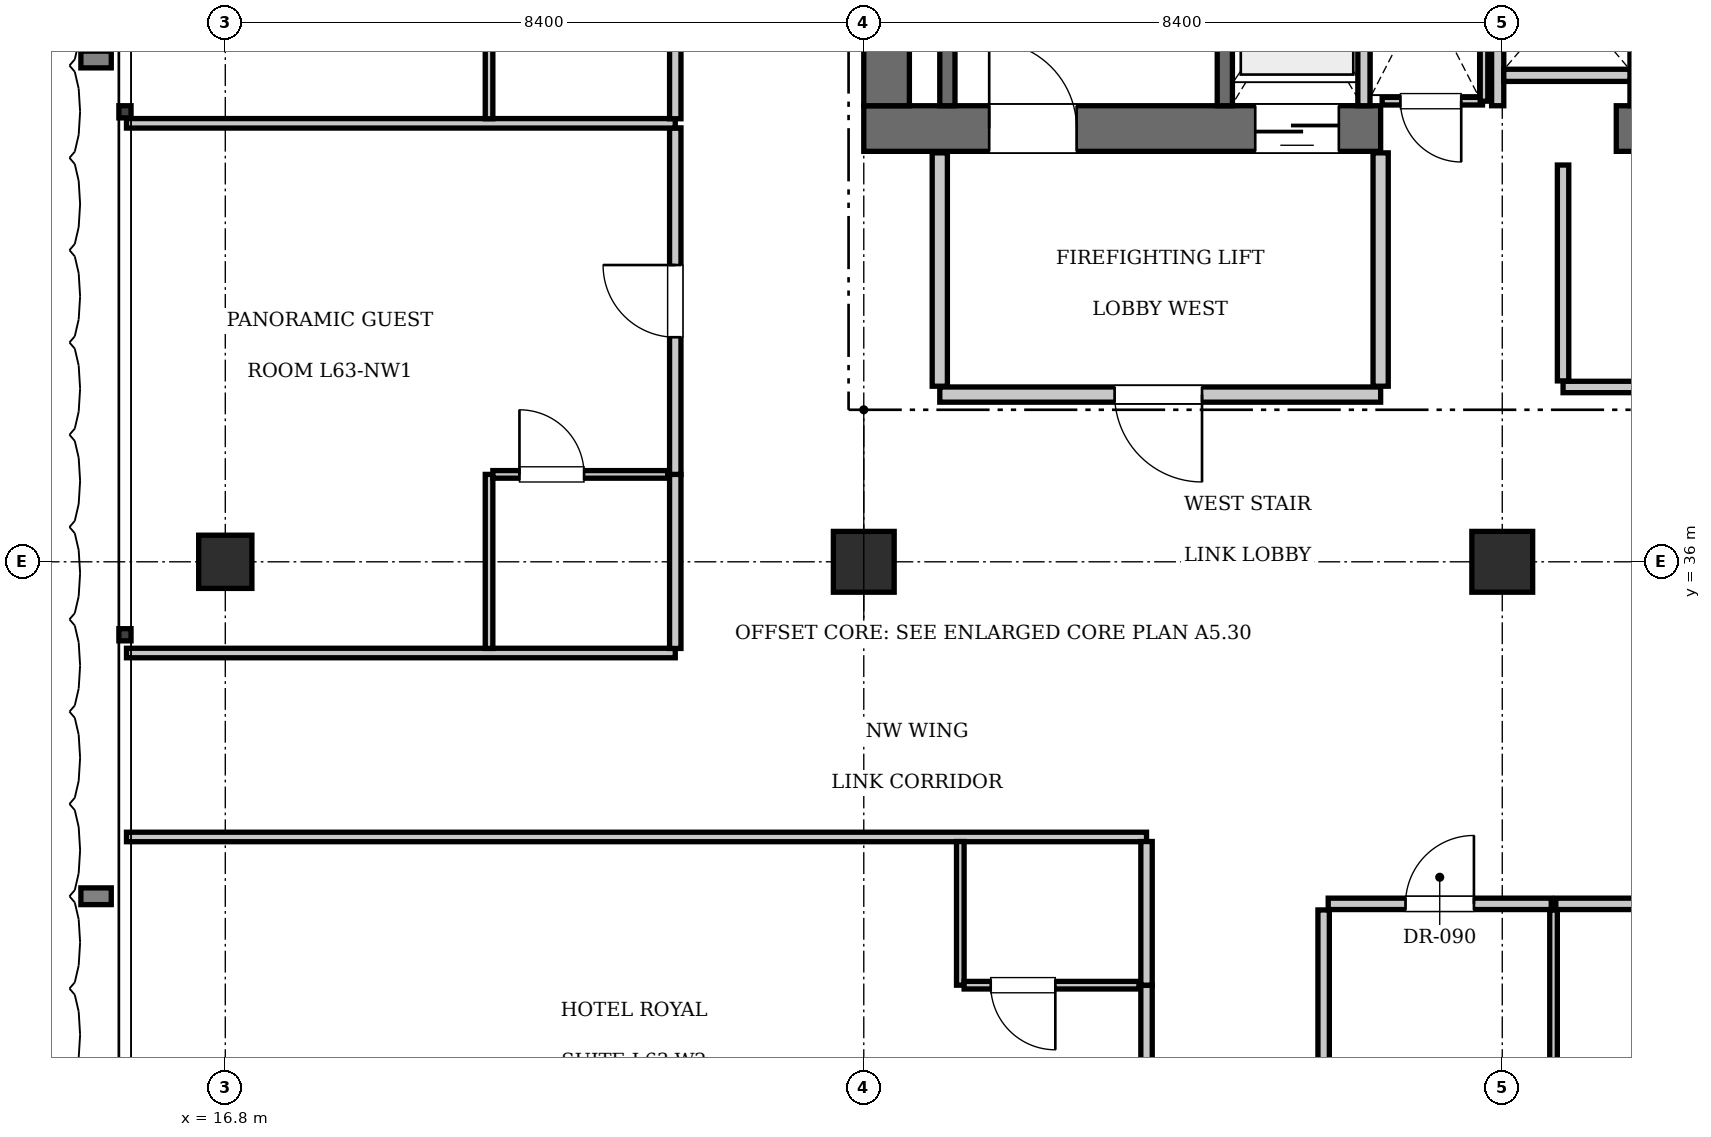
"""IFC4 building model, lengths in metres.
Left out: names, types, materials, properties, quantities, classifications, styles, units other than length and angle.
Written with IfcOpenShell. Run it as: python <this file> out.ifc"""

import sys

from ifc_helpers import new_model, si_unit, direction, frame, frame_2d, origin, origin_2d, place, context, subcontext, project, spatial, rectangle, extrude, element, fill, save


model = new_model("IFC4")
c1 = context("Model", 3, precision=1e-05, world=origin(), true_north=direction((0.0, 1.0)))
c2 = subcontext(c1, "Body", "Model", "MODEL_VIEW")
j1 = project(units=[si_unit("LENGTHUNIT", "METRE"), si_unit("PLANEANGLEUNIT", "RADIAN")], contexts=[c1])
p1 = place(None, origin())
s1 = spatial("IfcSite", under=j1, at=p1, CompositionType="ELEMENT")
p2 = place(p1, origin())
s2 = spatial("IfcBuilding", under=s1, at=p2, CompositionType="ELEMENT")
p3 = place(p2, frame((0.0, 0.0, 258.65)))
s3 = spatial("IfcBuildingStorey", under=s2, at=p3, CompositionType="ELEMENT", Elevation=258.65)
p4 = place(p3, frame((25.2, 41.7, 0.0), z_axis=(0.0, 0.0, 1.0), x_axis=(1.0, 0.0, 0.0)))
e1 = element("IfcWall", 1, at=p4, inside=s3, PredefinedType="SHEAR", context=c2, shape_type="SweptSolid", body=[
    extrude(rectangle(XDim=6.8, YDim=0.6, at=frame_2d((3.4, 0.0))), origin(), (0.0, 0.0, 1.0), 3.85),
])
p5 = place(p4, frame((1.65, 0.0, 0.0)))
e2 = element("IfcOpeningElement", 2, at=p5, cuts=e1, PredefinedType="OPENING", context=c2, shape_type="SweptSolid", body=[
    extrude(rectangle(XDim=1.15, YDim=2.15, at=frame_2d((0.575, 1.075))), frame((0.0, 0.31, 0.0), z_axis=(0.0, -1.0, 0.0), x_axis=(1.0, 0.0, 0.0)), (0.0, 0.0, 1.0), 0.62),
])
p6 = place(p4, frame((5.15, 0.0, 0.0)))
e3 = element("IfcOpeningElement", 3, at=p6, cuts=e1, PredefinedType="OPENING", context=c2, shape_type="SweptSolid", body=[
    extrude(rectangle(XDim=1.1, YDim=2.2, at=frame_2d((0.55, 1.1))), frame((0.0, 0.31, 0.0), z_axis=(0.0, -1.0, 0.0), x_axis=(1.0, 0.0, 0.0)), (0.0, 0.0, 1.0), 0.62),
])
p7 = place(p3, frame((35.1, 41.7, 0.0), z_axis=(0.0, 0.0, 1.0), x_axis=(1.0, 0.0, 0.0)))
e4 = element("IfcWall", 4, at=p7, inside=s3, PredefinedType="SHEAR", context=c2, shape_type="SweptSolid", body=[
    extrude(rectangle(XDim=5.4, YDim=0.6, at=frame_2d((2.7, 0.0))), origin(), (0.0, 0.0, 1.0), 3.85),
])
p8 = place(p3, frame((25.5, 42.0, 0.0), z_axis=(0.0, 0.0, 1.0), x_axis=(0.0, 1.0, 0.0)))
e5 = element("IfcWall", 5, at=p8, inside=s3, PredefinedType="SHEAR", context=c2, shape_type="SweptSolid", body=[
    extrude(rectangle(XDim=2.2, YDim=0.6, at=frame_2d((1.1, 0.0))), origin(), (0.0, 0.0, 1.0), 3.85),
])
for number, where, z_axis, x_axis in (
    (6, (25.2, 36.0, 0.0), (0.0, 0.0, 1.0), (1.0, 0.0, 0.0)),
    (7, (33.6, 36.0, 0.0), (0.0, 0.0, 1.0), (1.0, 0.0, 0.0)),
):
    element("IfcColumn", number, at=place(p3, frame(where, z_axis=z_axis, x_axis=x_axis)), inside=s3, PredefinedType="COLUMN", context=c2, shape_type="SweptSolid", body=[
        extrude(rectangle(XDim=0.8, YDim=0.8, at=origin_2d()), origin(), (0.0, 0.0, 1.0), 3.85),
    ])
p9 = place(p3, frame((16.8, 36.0, 0.0), z_axis=(0.0, 0.0, 1.0), x_axis=(1.0, 0.0, 0.0)))
e8 = element("IfcColumn", 8, at=p9, inside=s3, PredefinedType="COLUMN", context=c2, shape_type="SweptSolid", body=[
    extrude(rectangle(XDim=0.7, YDim=0.7, at=origin_2d()), origin(), (0.0, 0.0, 1.0), 3.85),
])
p10 = place(p3, frame((29.95, 42.0, 0.0), z_axis=(0.0, 0.0, 1.0), x_axis=(0.0, 1.0, 0.0)))
e9 = element("IfcWall", 9, at=p10, inside=s3, PredefinedType="SOLIDWALL", context=c2, shape_type="SweptSolid", body=[
    extrude(rectangle(XDim=9.15, YDim=0.2, at=frame_2d((4.575, 0.0))), origin(), (0.0, 0.0, 1.0), 3.61),
])
p11 = place(p3, frame((26.3, 42.0, 0.0), z_axis=(0.0, 0.0, 1.0), x_axis=(0.0, 1.0, 0.0)))
e10 = element("IfcWall", 10, at=p11, inside=s3, PredefinedType="SOLIDWALL", context=c2, shape_type="SweptSolid", body=[
    extrude(rectangle(XDim=9.12, YDim=0.2, at=frame_2d((4.56, 0.0))), origin(), (0.0, 0.0, 1.0), 3.61),
])
p12 = place(p3, frame((31.78, 42.0, 0.0), z_axis=(0.0, 0.0, 1.0), x_axis=(0.0, 1.0, 0.0)))
e11 = element("IfcWall", 11, at=p12, inside=s3, PredefinedType="SOLIDWALL", context=c2, shape_type="SweptSolid", body=[
    extrude(rectangle(XDim=2.74, YDim=0.16, at=frame_2d((1.37, 0.0))), origin(), (0.0, 0.0, 1.0), 3.61),
])
for number, where, z_axis, x_axis in (
    (12, (33.54, 42.0, 0.0), (0.0, 0.0, 1.0), (0.0, 1.0, 0.0)),
    (13, (35.36, 42.0, 0.0), (0.0, 0.0, 1.0), (0.0, 1.0, 0.0)),
):
    element("IfcWall", number, at=place(p3, frame(where, z_axis=z_axis, x_axis=x_axis)), inside=s3, PredefinedType="SOLIDWALL", context=c2, shape_type="SweptSolid", body=[
        extrude(rectangle(XDim=2.4, YDim=0.16, at=frame_2d((1.2, 0.0))), origin(), (0.0, 0.0, 1.0), 3.61),
    ])
p13 = place(p3, frame((33.62, 42.4, 0.0), z_axis=(0.0, 0.0, 1.0), x_axis=(1.0, 0.0, 0.0)))
e14 = element("IfcWall", 14, at=p13, inside=s3, PredefinedType="SOLIDWALL", context=c2, shape_type="SweptSolid", body=[
    extrude(rectangle(XDim=1.66, YDim=0.16, at=frame_2d((0.83, 0.0))), origin(), (0.0, 0.0, 1.0), 3.61),
])
p14 = place(p3, frame((26.2, 38.2, 0.0), z_axis=(0.0, 0.0, 1.0), x_axis=(1.0, 0.0, 0.0)))
e15 = element("IfcWall", 15, at=p14, inside=s3, PredefinedType="PARTITIONING", context=c2, shape_type="SweptSolid", body=[
    extrude(rectangle(XDim=5.8, YDim=0.2, at=frame_2d((2.9, 0.0))), origin(), (0.0, 0.0, 1.0), 3.61),
])
p15 = place(p14, frame((2.3, 0.0, 0.0)))
e16 = element("IfcOpeningElement", 16, at=p15, cuts=e15, PredefinedType="OPENING", context=c2, shape_type="SweptSolid", body=[
    extrude(rectangle(XDim=1.15, YDim=2.15, at=frame_2d((0.575, 1.075))), frame((0.0, 0.11, 0.0), z_axis=(0.0, -1.0, 0.0), x_axis=(1.0, 0.0, 0.0)), (0.0, 0.0, 1.0), 0.22),
])
for number, where, z_axis, x_axis in (
    (17, (26.2, 38.31, 0.0), (0.0, 0.0, 1.0), (0.0, 1.0, 0.0)),
    (18, (32.0, 38.31, 0.0), (0.0, 0.0, 1.0), (0.0, 1.0, 0.0)),
):
    element("IfcWall", number, at=place(p3, frame(where, z_axis=z_axis, x_axis=x_axis)), inside=s3, PredefinedType="PARTITIONING", context=c2, shape_type="SweptSolid", body=[
        extrude(rectangle(XDim=3.07, YDim=0.2, at=frame_2d((1.535, 0.0))), origin(), (0.0, 0.0, 1.0), 3.61),
    ])
p16 = place(p3, frame((32.02, 42.06, 0.0), z_axis=(0.0, 0.0, 1.0), x_axis=(1.0, 0.0, 0.0)))
e19 = element("IfcWall", 19, at=p16, inside=s3, PredefinedType="PARTITIONING", context=c2, shape_type="SweptSolid", body=[
    extrude(rectangle(XDim=1.32, YDim=0.1, at=frame_2d((0.66, 0.0))), origin(), (0.0, 0.0, 1.0), 3.61),
])
p17 = place(p16, frame((0.24, 0.0, 0.0)))
e20 = element("IfcOpeningElement", 20, at=p17, cuts=e19, PredefinedType="OPENING", context=c2, shape_type="SweptSolid", body=[
    extrude(rectangle(XDim=0.8, YDim=2.05, at=frame_2d((0.4, 1.025))), frame((0.0, 0.06, 0.0), z_axis=(0.0, -1.0, 0.0), x_axis=(1.0, 0.0, 0.0)), (0.0, 0.0, 1.0), 0.12),
])
p18 = place(p3, frame((33.36, 42.06, 0.0), z_axis=(0.0, 0.0, 1.0), x_axis=(0.0, 1.0, 0.0)))
e21 = element("IfcWall", 21, at=p18, inside=s3, PredefinedType="PARTITIONING", context=c2, shape_type="SweptSolid", body=[
    extrude(rectangle(XDim=2.88, YDim=0.1, at=frame_2d((1.44, 0.0))), origin(), (0.0, 0.0, 1.0), 3.61),
])
p19 = place(p3, frame((34.4, 38.3, 0.0), z_axis=(0.0, 0.0, 1.0), x_axis=(1.0, 0.0, 0.0)))
e22 = element("IfcWall", 22, at=p19, inside=s3, PredefinedType="PARTITIONING", context=c2, shape_type="SweptSolid", body=[
    extrude(rectangle(XDim=5.92, YDim=0.15, at=frame_2d((2.96, 0.0))), origin(), (0.0, 0.0, 1.0), 3.61),
])
p20 = place(p19, frame((2.4, 0.0, 0.0)))
e23 = element("IfcOpeningElement", 23, at=p20, cuts=e22, PredefinedType="OPENING", context=c2, shape_type="SweptSolid", body=[
    extrude(rectangle(XDim=0.9, YDim=2.1, at=frame_2d((0.45, 1.05))), frame((0.0, 0.085, 0.0), z_axis=(0.0, -1.0, 0.0), x_axis=(1.0, 0.0, 0.0)), (0.0, 0.0, 1.0), 0.17),
])
p21 = place(p3, frame((34.4, 38.38, 0.0), z_axis=(0.0, 0.0, 1.0), x_axis=(0.0, 1.0, 0.0)))
e24 = element("IfcWall", 24, at=p21, inside=s3, PredefinedType="PARTITIONING", context=c2, shape_type="SweptSolid", body=[
    extrude(rectangle(XDim=2.84, YDim=0.15, at=frame_2d((1.42, 0.0))), origin(), (0.0, 0.0, 1.0), 3.61),
])
p22 = place(p3, frame((31.25, 22.53, 0.0), z_axis=(0.0, 0.0, 1.0), x_axis=(0.0, 1.0, 0.0)))
e25 = element("IfcWall", 25, at=p22, inside=s3, PredefinedType="PARTITIONING", context=c2, shape_type="SweptSolid", body=[
    extrude(rectangle(XDim=8.89, YDim=0.15, at=frame_2d((4.445, 0.0))), origin(), (0.0, 0.0, 1.0), 3.61),
])
p23 = place(p3, frame((31.31, 31.5, 0.0), z_axis=(0.0, 0.0, 1.0), x_axis=(1.0, 0.0, 0.0)))
e26 = element("IfcWall", 26, at=p23, inside=s3, PredefinedType="PARTITIONING", context=c2, shape_type="SweptSolid", body=[
    extrude(rectangle(XDim=2.934, YDim=0.15, at=frame_2d((1.467, 0.0))), origin(), (0.0, 0.0, 1.0), 3.61),
])
p24 = place(p23, frame((1.017, 0.0, 0.0)))
e27 = element("IfcOpeningElement", 27, at=p24, cuts=e26, PredefinedType="OPENING", context=c2, shape_type="SweptSolid", body=[
    extrude(rectangle(XDim=0.9, YDim=2.1, at=frame_2d((0.45, 1.05))), frame((0.0, 0.085, 0.0), z_axis=(0.0, -1.0, 0.0), x_axis=(1.0, 0.0, 0.0)), (0.0, 0.0, 1.0), 0.17),
])
p25 = place(p3, frame((34.274, 22.53, 0.0), z_axis=(0.0, 0.0, 1.0), x_axis=(0.0, 1.0, 0.0)))
e28 = element("IfcWall", 28, at=p25, inside=s3, PredefinedType="PARTITIONING", context=c2, shape_type="SweptSolid", body=[
    extrude(rectangle(XDim=8.89, YDim=0.1, at=frame_2d((4.445, 0.0))), origin(), (0.0, 0.0, 1.0), 3.61),
])
p26 = place(p3, frame((34.304, 31.5, 0.0), z_axis=(0.0, 0.0, 1.0), x_axis=(1.0, 0.0, 0.0)))
e29 = element("IfcWall", 29, at=p26, inside=s3, PredefinedType="PARTITIONING", context=c2, shape_type="SweptSolid", body=[
    extrude(rectangle(XDim=4.411, YDim=0.15, at=frame_2d((2.206, 0.0))), origin(), (0.0, 0.0, 1.0), 3.61),
])
p27 = place(p26, frame((1.756, 0.0, 0.0)))
e30 = element("IfcOpeningElement", 30, at=p27, cuts=e29, PredefinedType="OPENING", context=c2, shape_type="SweptSolid", body=[
    extrude(rectangle(XDim=0.9, YDim=2.1, at=frame_2d((0.45, 1.05))), frame((0.0, 0.085, 0.0), z_axis=(0.0, -1.0, 0.0), x_axis=(1.0, 0.0, 0.0)), (0.0, 0.0, 1.0), 0.17),
])
p28 = place(p3, frame((15.5, 32.38, 0.0), z_axis=(0.0, 0.0, 1.0), x_axis=(1.0, 0.0, 0.0)))
e31 = element("IfcWall", 31, at=p28, inside=s3, PredefinedType="PARTITIONING", context=c2, shape_type="SweptSolid", body=[
    extrude(rectangle(XDim=13.42, YDim=0.125, at=frame_2d((6.71, 0.0))), origin(), (0.0, 0.0, 1.0), 3.61),
])
p29 = place(p3, frame((28.92, 27.5, 0.0), z_axis=(0.0, 0.0, 1.0), x_axis=(0.0, 1.0, 0.0)))
e32 = element("IfcWall", 32, at=p29, inside=s3, PredefinedType="PARTITIONING", context=c2, shape_type="SweptSolid", body=[
    extrude(rectangle(XDim=2.93, YDim=0.15, at=frame_2d((1.465, 0.0))), origin(), (0.0, 0.0, 1.0), 3.61),
])
p30 = place(p29, frame((0.99, 0.0, 0.0)))
e33 = element("IfcOpeningElement", 33, at=p30, cuts=e32, PredefinedType="OPENING", context=c2, shape_type="SweptSolid", body=[
    extrude(rectangle(XDim=0.95, YDim=2.15, at=frame_2d((0.475, 1.075))), frame((0.0, 0.085, 0.0), z_axis=(0.0, -1.0, 0.0), x_axis=(1.0, 0.0, 0.0)), (0.0, 0.0, 1.0), 0.17),
])
p31 = place(p3, frame((28.92, 30.43, 0.0), z_axis=(0.0, 0.0, 1.0), x_axis=(0.0, 1.0, 0.0)))
e34 = element("IfcWall", 34, at=p31, inside=s3, PredefinedType="PARTITIONING", context=c2, shape_type="SweptSolid", body=[
    extrude(rectangle(XDim=1.89, YDim=0.15, at=frame_2d((0.945, 0.0))), origin(), (0.0, 0.0, 1.0), 3.61),
])
p32 = place(p3, frame((26.47, 30.43, 0.0), z_axis=(0.0, 0.0, 1.0), x_axis=(0.0, 1.0, 0.0)))
e35 = element("IfcWall", 35, at=p32, inside=s3, PredefinedType="PARTITIONING", context=c2, shape_type="SweptSolid", body=[
    extrude(rectangle(XDim=1.89, YDim=0.1, at=frame_2d((0.945, 0.0))), origin(), (0.0, 0.0, 1.0), 3.61),
])
p33 = place(p3, frame((26.52, 30.43, 0.0), z_axis=(0.0, 0.0, 1.0), x_axis=(1.0, 0.0, 0.0)))
e36 = element("IfcWall", 36, at=p33, inside=s3, PredefinedType="PARTITIONING", context=c2, shape_type="SweptSolid", body=[
    extrude(rectangle(XDim=2.3, YDim=0.1, at=frame_2d((1.15, 0.0))), origin(), (0.0, 0.0, 1.0), 3.61),
])
p34 = place(p33, frame((0.35, 0.0, 0.0)))
e37 = element("IfcOpeningElement", 37, at=p34, cuts=e36, PredefinedType="OPENING", context=c2, shape_type="SweptSolid", body=[
    extrude(rectangle(XDim=0.85, YDim=2.1, at=frame_2d((0.425, 1.05))), frame((0.0, 0.06, 0.0), z_axis=(0.0, -1.0, 0.0), x_axis=(1.0, 0.0, 0.0)), (0.0, 0.0, 1.0), 0.12),
])
p35 = place(p3, frame((15.5, 34.8, 0.0), z_axis=(0.0, 0.0, 1.0), x_axis=(1.0, 0.0, 0.0)))
e38 = element("IfcWall", 38, at=p35, inside=s3, PredefinedType="PARTITIONING", context=c2, shape_type="SweptSolid", body=[
    extrude(rectangle(XDim=7.22, YDim=0.125, at=frame_2d((3.61, 0.0))), origin(), (0.0, 0.0, 1.0), 3.61),
])
p36 = place(p3, frame((22.72, 34.86, 0.0), z_axis=(0.0, 0.0, 1.0), x_axis=(0.0, 1.0, 0.0)))
e39 = element("IfcWall", 39, at=p36, inside=s3, PredefinedType="PARTITIONING", context=c2, shape_type="SweptSolid", body=[
    extrude(rectangle(XDim=2.29, YDim=0.15, at=frame_2d((1.145, 0.0))), origin(), (0.0, 0.0, 1.0), 3.61),
])
p37 = place(p3, frame((22.72, 37.15, 0.0), z_axis=(0.0, 0.0, 1.0), x_axis=(0.0, 1.0, 0.0)))
e40 = element("IfcWall", 40, at=p37, inside=s3, PredefinedType="PARTITIONING", context=c2, shape_type="SweptSolid", body=[
    extrude(rectangle(XDim=4.559, YDim=0.15, at=frame_2d((2.279, 0.0))), origin(), (0.0, 0.0, 1.0), 3.61),
])
p38 = place(p37, frame((1.804, 0.0, 0.0)))
e41 = element("IfcOpeningElement", 41, at=p38, cuts=e40, PredefinedType="OPENING", context=c2, shape_type="SweptSolid", body=[
    extrude(rectangle(XDim=0.95, YDim=2.15, at=frame_2d((0.475, 1.075))), frame((0.0, 0.085, 0.0), z_axis=(0.0, -1.0, 0.0), x_axis=(1.0, 0.0, 0.0)), (0.0, 0.0, 1.0), 0.17),
])
p39 = place(p3, frame((20.27, 34.86, 0.0), z_axis=(0.0, 0.0, 1.0), x_axis=(0.0, 1.0, 0.0)))
e42 = element("IfcWall", 42, at=p39, inside=s3, PredefinedType="PARTITIONING", context=c2, shape_type="SweptSolid", body=[
    extrude(rectangle(XDim=2.29, YDim=0.1, at=frame_2d((1.145, 0.0))), origin(), (0.0, 0.0, 1.0), 3.61),
])
p40 = place(p3, frame((20.32, 37.15, 0.0), z_axis=(0.0, 0.0, 1.0), x_axis=(1.0, 0.0, 0.0)))
e43 = element("IfcWall", 43, at=p40, inside=s3, PredefinedType="PARTITIONING", context=c2, shape_type="SweptSolid", body=[
    extrude(rectangle(XDim=2.3, YDim=0.1, at=frame_2d((1.15, 0.0))), origin(), (0.0, 0.0, 1.0), 3.61),
])
p41 = place(p40, frame((0.35, 0.0, 0.0)))
e44 = element("IfcOpeningElement", 44, at=p41, cuts=e43, PredefinedType="OPENING", context=c2, shape_type="SweptSolid", body=[
    extrude(rectangle(XDim=0.85, YDim=2.1, at=frame_2d((0.425, 1.05))), frame((0.0, 0.06, 0.0), z_axis=(0.0, -1.0, 0.0), x_axis=(1.0, 0.0, 0.0)), (0.0, 0.0, 1.0), 0.12),
])
p42 = place(p3, frame((15.5, 41.769, 0.0), z_axis=(0.0, 0.0, 1.0), x_axis=(1.0, 0.0, 0.0)))
e45 = element("IfcWall", 45, at=p42, inside=s3, PredefinedType="PARTITIONING", context=c2, shape_type="SweptSolid", body=[
    extrude(rectangle(XDim=7.22, YDim=0.125, at=frame_2d((3.61, 0.0))), origin(), (0.0, 0.0, 1.0), 3.61),
])
p43 = place(p3, frame((22.72, 41.829, 0.0), z_axis=(0.0, 0.0, 1.0), x_axis=(0.0, 1.0, 0.0)))
e46 = element("IfcWall", 46, at=p43, inside=s3, PredefinedType="PARTITIONING", context=c2, shape_type="SweptSolid", body=[
    extrude(rectangle(XDim=2.29, YDim=0.15, at=frame_2d((1.145, 0.0))), origin(), (0.0, 0.0, 1.0), 3.61),
])
p44 = place(p3, frame((20.27, 41.829, 0.0), z_axis=(0.0, 0.0, 1.0), x_axis=(0.0, 1.0, 0.0)))
e47 = element("IfcWall", 47, at=p44, inside=s3, PredefinedType="PARTITIONING", context=c2, shape_type="SweptSolid", body=[
    extrude(rectangle(XDim=2.29, YDim=0.1, at=frame_2d((1.145, 0.0))), origin(), (0.0, 0.0, 1.0), 3.61),
])
p45 = place(p5, origin())
e48 = element("IfcDoor", 48, at=p45, inside=s3, OperationType="SINGLE_SWING_LEFT", PredefinedType="DOOR", context=c2, shape_type="SweptSolid", body=[
    extrude(rectangle(XDim=1.15, YDim=2.15, at=frame_2d((0.575, 1.075))), frame((0.0, 0.025, 0.0), z_axis=(0.0, -1.0, 0.0), x_axis=(1.0, 0.0, 0.0)), (0.0, 0.0, 1.0), 0.05),
])
fill(e2, e48)
p46 = place(p6, frame((1.1, 0.0, 0.0), z_axis=(0.0, 0.0, 1.0), x_axis=(-1.0, 0.0, 0.0)))
e49 = element("IfcDoor", 49, at=p46, inside=s3, OperationType="SLIDING_TO_LEFT", PredefinedType="DOOR", context=c2, shape_type="SweptSolid", body=[
    extrude(rectangle(XDim=1.1, YDim=2.2, at=frame_2d((0.55, 1.1))), frame((0.0, 0.025, 0.0), z_axis=(0.0, -1.0, 0.0), x_axis=(1.0, 0.0, 0.0)), (0.0, 0.0, 1.0), 0.05),
])
fill(e3, e49)
p47 = place(p15, frame((1.15, 0.0, 0.0), z_axis=(0.0, 0.0, 1.0), x_axis=(-1.0, 0.0, 0.0)))
e50 = element("IfcDoor", 50, at=p47, inside=s3, OperationType="SINGLE_SWING_LEFT", PredefinedType="DOOR", context=c2, shape_type="SweptSolid", body=[
    extrude(rectangle(XDim=1.15, YDim=2.15, at=frame_2d((0.575, 1.075))), frame((0.0, 0.025, 0.0), z_axis=(0.0, -1.0, 0.0), x_axis=(1.0, 0.0, 0.0)), (0.0, 0.0, 1.0), 0.05),
])
fill(e16, e50)
p48 = place(p17, frame((0.8, 0.0, 0.0), z_axis=(0.0, 0.0, 1.0), x_axis=(-1.0, 0.0, 0.0)))
e51 = element("IfcDoor", 51, at=p48, inside=s3, OperationType="SINGLE_SWING_LEFT", PredefinedType="DOOR", context=c2, shape_type="SweptSolid", body=[
    extrude(rectangle(XDim=0.8, YDim=2.05, at=frame_2d((0.4, 1.025))), frame((0.0, 0.025, 0.0), z_axis=(0.0, -1.0, 0.0), x_axis=(1.0, 0.0, 0.0)), (0.0, 0.0, 1.0), 0.05),
])
fill(e20, e51)
p49 = place(p24, origin())
e52 = element("IfcDoor", 52, at=p49, inside=s3, OperationType="SINGLE_SWING_RIGHT", PredefinedType="DOOR", context=c2, shape_type="SweptSolid", body=[
    extrude(rectangle(XDim=0.9, YDim=2.1, at=frame_2d((0.45, 1.05))), frame((0.0, 0.025, 0.0), z_axis=(0.0, -1.0, 0.0), x_axis=(1.0, 0.0, 0.0)), (0.0, 0.0, 1.0), 0.05),
])
fill(e27, e52)
p50 = place(p34, frame((0.85, 0.0, 0.0), z_axis=(0.0, 0.0, 1.0), x_axis=(-1.0, 0.0, 0.0)))
e53 = element("IfcDoor", 53, at=p50, inside=s3, OperationType="SINGLE_SWING_LEFT", PredefinedType="DOOR", context=c2, shape_type="SweptSolid", body=[
    extrude(rectangle(XDim=0.85, YDim=2.1, at=frame_2d((0.425, 1.05))), frame((0.0, 0.025, 0.0), z_axis=(0.0, -1.0, 0.0), x_axis=(1.0, 0.0, 0.0)), (0.0, 0.0, 1.0), 0.05),
])
fill(e37, e53)
p51 = place(p41, origin())
e54 = element("IfcDoor", 54, at=p51, inside=s3, OperationType="SINGLE_SWING_LEFT", PredefinedType="DOOR", context=c2, shape_type="SweptSolid", body=[
    extrude(rectangle(XDim=0.85, YDim=2.1, at=frame_2d((0.425, 1.05))), frame((0.0, 0.025, 0.0), z_axis=(0.0, -1.0, 0.0), x_axis=(1.0, 0.0, 0.0)), (0.0, 0.0, 1.0), 0.05),
])
fill(e44, e54)
p52 = place(p38, origin())
e55 = element("IfcDoor", 55, at=p52, inside=s3, OperationType="SINGLE_SWING_RIGHT", PredefinedType="DOOR", context=c2, shape_type="SweptSolid", body=[
    extrude(rectangle(XDim=0.95, YDim=2.15, at=frame_2d((0.475, 1.075))), frame((0.0, 0.025, 0.0), z_axis=(0.0, -1.0, 0.0), x_axis=(1.0, 0.0, 0.0)), (0.0, 0.0, 1.0), 0.05),
])
fill(e41, e55)
save(model, sys.argv[1])
